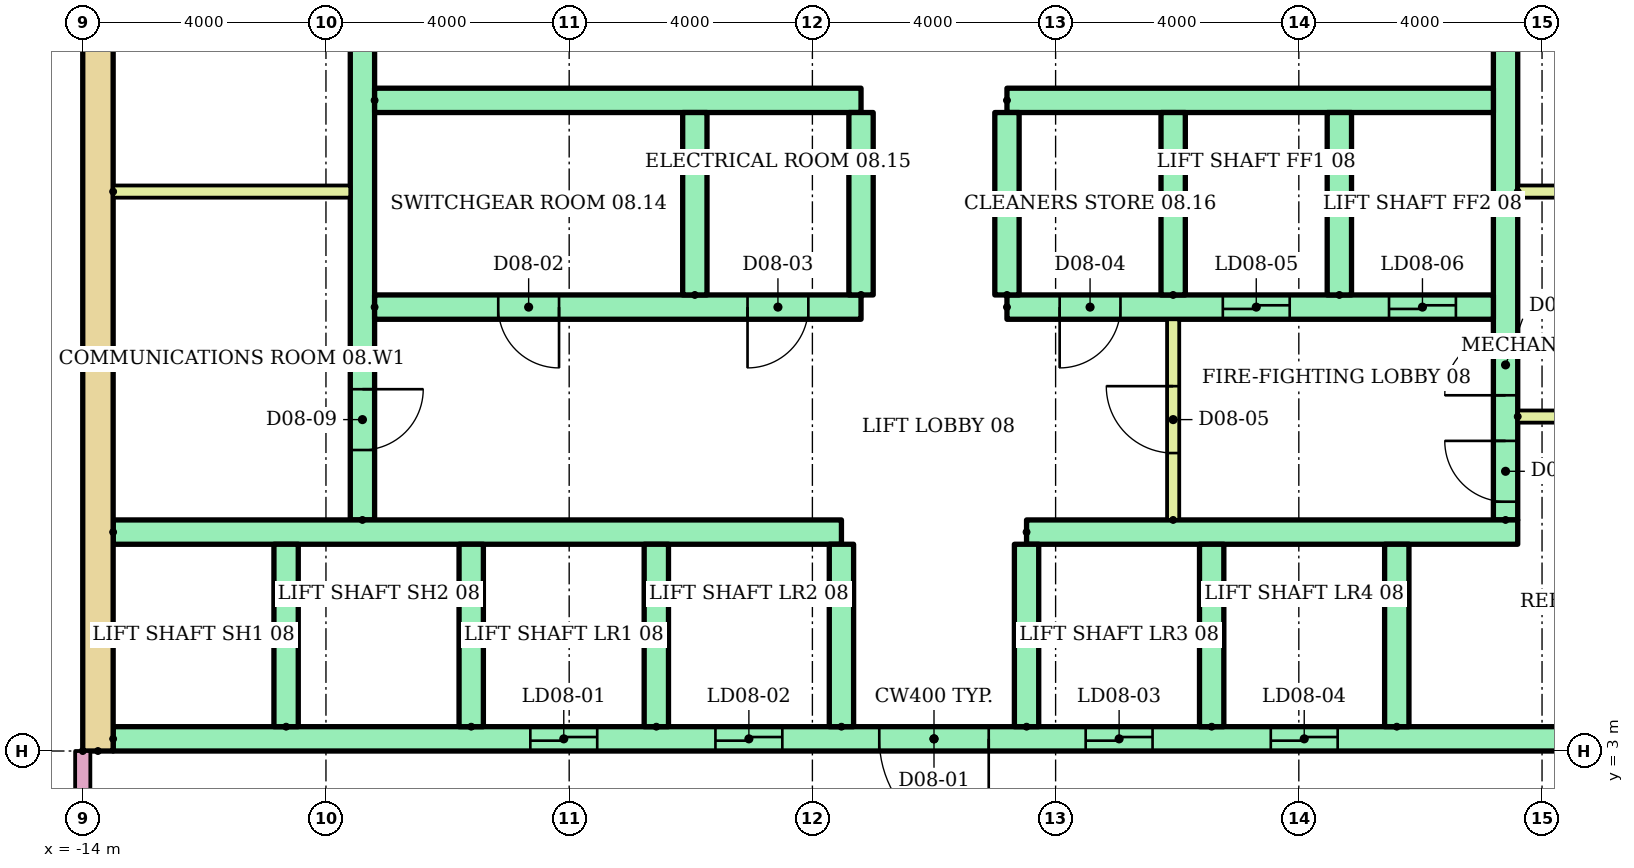
"""IFC4 building model, lengths in metres.
Left out: names, types, materials, properties, quantities, classifications, styles, units other than length and angle.
Written with IfcOpenShell. Run it as: python <this file> out.ifc"""

import sys

from ifc_helpers import new_model, si_unit, direction, frame, frame_2d, origin, place, context, subcontext, project, spatial, rectangle, extrude, element, fill, save


model = new_model("IFC4")
c1 = context("Model", 3, precision=1e-05, world=origin(), true_north=direction((0.0, 1.0)))
c2 = subcontext(c1, "Body", "Model", "MODEL_VIEW")
j1 = project(units=[si_unit("LENGTHUNIT", "METRE"), si_unit("PLANEANGLEUNIT", "RADIAN")], contexts=[c1])
p1 = place(None, origin())
s1 = spatial("IfcSite", under=j1, at=p1, CompositionType="ELEMENT")
p2 = place(p1, origin())
s2 = spatial("IfcBuilding", under=s1, at=p2, CompositionType="ELEMENT")
p3 = place(p2, frame((0.0, 0.0, 33.8)))
s3 = spatial("IfcBuildingStorey", under=s2, at=p3, CompositionType="ELEMENT", Elevation=33.8)
p4 = place(p3, frame((-13.75, 3.0, 0.0), z_axis=(0.0, 0.0, 1.0), x_axis=(0.0, 1.0, 0.0)))
e1 = element("IfcWall", 1, at=p4, inside=s3, PredefinedType="SHEAR", context=c2, shape_type="SweptSolid", body=[
    extrude(rectangle(XDim=17.0, YDim=0.5, at=frame_2d((8.5, 0.0))), origin(), (0.0, 0.0, 1.0), 3.6),
])
p5 = place(p3, frame((-9.4, 6.8, 0.0), z_axis=(0.0, 0.0, 1.0), x_axis=(0.0, 1.0, 0.0)))
e2 = element("IfcWall", 2, at=p5, inside=s3, PredefinedType="SHEAR", context=c2, shape_type="SweptSolid", body=[
    extrude(rectangle(XDim=12.7, YDim=0.4, at=frame_2d((6.35, 0.0))), origin(), (0.0, 0.0, 1.0), 3.6),
])
p6 = place(p5, frame((1.15, 0.0, 0.0)))
e3 = element("IfcOpeningElement", 3, at=p6, cuts=e2, PredefinedType="OPENING", context=c2, shape_type="SweptSolid", body=[
    extrude(rectangle(XDim=1.0, YDim=2.1, at=frame_2d((0.5, 1.05))), frame((0.0, 0.21, 0.0), z_axis=(0.0, -1.0, 0.0), x_axis=(1.0, 0.0, 0.0)), (0.0, 0.0, 1.0), 0.42),
])
p7 = place(p5, frame((7.925, 0.0, 0.0)))
e4 = element("IfcOpeningElement", 4, at=p7, cuts=e2, PredefinedType="OPENING", context=c2, shape_type="SweptSolid", body=[
    extrude(rectangle(XDim=1.0, YDim=2.1, at=frame_2d((0.5, 1.05))), frame((0.0, 0.21, 0.0), z_axis=(0.0, -1.0, 0.0), x_axis=(1.0, 0.0, 0.0)), (0.0, 0.0, 1.0), 0.42),
])
p8 = place(p3, frame((9.4, 6.8, 0.0), z_axis=(0.0, 0.0, 1.0), x_axis=(0.0, 1.0, 0.0)))
e5 = element("IfcWall", 5, at=p8, inside=s3, PredefinedType="SHEAR", context=c2, shape_type="SweptSolid", body=[
    extrude(rectangle(XDim=12.7, YDim=0.4, at=frame_2d((6.35, 0.0))), origin(), (0.0, 0.0, 1.0), 3.6),
])
p9 = place(p8, frame((0.3, 0.0, 0.0)))
e6 = element("IfcOpeningElement", 6, at=p9, cuts=e5, PredefinedType="OPENING", context=c2, shape_type="SweptSolid", body=[
    extrude(rectangle(XDim=1.0, YDim=2.1, at=frame_2d((0.5, 1.05))), frame((0.0, 0.21, 0.0), z_axis=(0.0, -1.0, 0.0), x_axis=(1.0, 0.0, 0.0)), (0.0, 0.0, 1.0), 0.42),
])
p10 = place(p8, frame((2.05, 0.0, 0.0)))
e7 = element("IfcOpeningElement", 7, at=p10, cuts=e5, PredefinedType="OPENING", context=c2, shape_type="SweptSolid", body=[
    extrude(rectangle(XDim=1.0, YDim=2.1, at=frame_2d((0.5, 1.05))), frame((0.0, 0.21, 0.0), z_axis=(0.0, -1.0, 0.0), x_axis=(1.0, 0.0, 0.0)), (0.0, 0.0, 1.0), 0.42),
])
p11 = place(p8, frame((7.925, 0.0, 0.0)))
e8 = element("IfcOpeningElement", 8, at=p11, cuts=e5, PredefinedType="OPENING", context=c2, shape_type="SweptSolid", body=[
    extrude(rectangle(XDim=1.0, YDim=2.1, at=frame_2d((0.5, 1.05))), frame((0.0, 0.21, 0.0), z_axis=(0.0, -1.0, 0.0), x_axis=(1.0, 0.0, 0.0)), (0.0, 0.0, 1.0), 0.42),
])
p12 = place(p3, frame((-13.5, 3.2, 0.0)))
e9 = element("IfcWall", 9, at=p12, inside=s3, PredefinedType="SHEAR", context=c2, shape_type="SweptSolid", body=[
    extrude(rectangle(XDim=27.0, YDim=0.4, at=frame_2d((13.5, 0.0))), origin(), (0.0, 0.0, 1.0), 3.6),
])
p13 = place(p12, frame((6.861, 0.0, 0.0)))
e10 = element("IfcOpeningElement", 10, at=p13, cuts=e9, PredefinedType="OPENING", context=c2, shape_type="SweptSolid", body=[
    extrude(rectangle(XDim=1.1, YDim=2.1, at=frame_2d((0.55, 1.05))), frame((0.0, 0.21, 0.0), z_axis=(0.0, -1.0, 0.0), x_axis=(1.0, 0.0, 0.0)), (0.0, 0.0, 1.0), 0.42),
])
p14 = place(p12, frame((9.906, 0.0, 0.0)))
e11 = element("IfcOpeningElement", 11, at=p14, cuts=e9, PredefinedType="OPENING", context=c2, shape_type="SweptSolid", body=[
    extrude(rectangle(XDim=1.1, YDim=2.1, at=frame_2d((0.55, 1.05))), frame((0.0, 0.21, 0.0), z_axis=(0.0, -1.0, 0.0), x_axis=(1.0, 0.0, 0.0)), (0.0, 0.0, 1.0), 0.42),
])
p15 = place(p12, frame((15.994, 0.0, 0.0)))
e12 = element("IfcOpeningElement", 12, at=p15, cuts=e9, PredefinedType="OPENING", context=c2, shape_type="SweptSolid", body=[
    extrude(rectangle(XDim=1.1, YDim=2.1, at=frame_2d((0.55, 1.05))), frame((0.0, 0.21, 0.0), z_axis=(0.0, -1.0, 0.0), x_axis=(1.0, 0.0, 0.0)), (0.0, 0.0, 1.0), 0.42),
])
p16 = place(p12, frame((19.039, 0.0, 0.0)))
e13 = element("IfcOpeningElement", 13, at=p16, cuts=e9, PredefinedType="OPENING", context=c2, shape_type="SweptSolid", body=[
    extrude(rectangle(XDim=1.1, YDim=2.1, at=frame_2d((0.55, 1.05))), frame((0.0, 0.21, 0.0), z_axis=(0.0, -1.0, 0.0), x_axis=(1.0, 0.0, 0.0)), (0.0, 0.0, 1.0), 0.42),
])
p17 = place(p12, frame((12.6, 0.0, 0.0)))
e14 = element("IfcOpeningElement", 14, at=p17, cuts=e9, PredefinedType="OPENING", context=c2, shape_type="SweptSolid", body=[
    extrude(rectangle(XDim=1.8, YDim=2.1, at=frame_2d((0.9, 1.05))), frame((0.0, 0.21, 0.0), z_axis=(0.0, -1.0, 0.0), x_axis=(1.0, 0.0, 0.0)), (0.0, 0.0, 1.0), 0.42),
])
p18 = place(p3, frame((-13.5, 6.6, 0.0)))
e15 = element("IfcWall", 15, at=p18, inside=s3, PredefinedType="SHEAR", context=c2, shape_type="SweptSolid", body=[
    extrude(rectangle(XDim=11.978, YDim=0.4, at=frame_2d((5.989, 0.0))), origin(), (0.0, 0.0, 1.0), 3.6),
])
p19 = place(p3, frame((1.522, 6.6, 0.0)))
e16 = element("IfcWall", 16, at=p19, inside=s3, PredefinedType="SHEAR", context=c2, shape_type="SweptSolid", body=[
    extrude(rectangle(XDim=8.078, YDim=0.4, at=frame_2d((4.039, 0.0))), origin(), (0.0, 0.0, 1.0), 3.6),
])
for number, where, z_axis, x_axis in (
    (17, (-10.656, 3.4, 0.0), (0.0, 0.0, 1.0), (0.0, 1.0, 0.0)),
    (18, (-7.611, 3.4, 0.0), (0.0, 0.0, 1.0), (0.0, 1.0, 0.0)),
    (19, (-4.567, 3.4, 0.0), (0.0, 0.0, 1.0), (0.0, 1.0, 0.0)),
    (20, (-1.522, 3.4, 0.0), (0.0, 0.0, 1.0), (0.0, 1.0, 0.0)),
    (21, (1.522, 3.4, 0.0), (0.0, 0.0, 1.0), (0.0, 1.0, 0.0)),
    (22, (4.567, 3.4, 0.0), (0.0, 0.0, 1.0), (0.0, 1.0, 0.0)),
    (23, (7.611, 3.4, 0.0), (0.0, 0.0, 1.0), (0.0, 1.0, 0.0)),
):
    element("IfcWall", number, at=place(p3, frame(where, z_axis=z_axis, x_axis=x_axis)), inside=s3, PredefinedType="SHEAR", context=c2, shape_type="SweptSolid", body=[
        extrude(rectangle(XDim=3.0, YDim=0.4, at=frame_2d((1.5, 0.0))), origin(), (0.0, 0.0, 1.0), 3.6),
    ])
p20 = place(p3, frame((-9.2, 10.3, 0.0)))
e24 = element("IfcWall", 24, at=p20, inside=s3, PredefinedType="SHEAR", context=c2, shape_type="SweptSolid", body=[
    extrude(rectangle(XDim=8.0, YDim=0.4, at=frame_2d((4.0, 0.0))), origin(), (0.0, 0.0, 1.0), 3.6),
])
p21 = place(p20, frame((2.033, 0.0, 0.0)))
e25 = element("IfcOpeningElement", 25, at=p21, cuts=e24, PredefinedType="OPENING", context=c2, shape_type="SweptSolid", body=[
    extrude(rectangle(XDim=1.0, YDim=2.1, at=frame_2d((0.5, 1.05))), frame((0.0, 0.21, 0.0), z_axis=(0.0, -1.0, 0.0), x_axis=(1.0, 0.0, 0.0)), (0.0, 0.0, 1.0), 0.42),
])
p22 = place(p20, frame((6.133, 0.0, 0.0)))
e26 = element("IfcOpeningElement", 26, at=p22, cuts=e24, PredefinedType="OPENING", context=c2, shape_type="SweptSolid", body=[
    extrude(rectangle(XDim=1.0, YDim=2.1, at=frame_2d((0.5, 1.05))), frame((0.0, 0.21, 0.0), z_axis=(0.0, -1.0, 0.0), x_axis=(1.0, 0.0, 0.0)), (0.0, 0.0, 1.0), 0.42),
])
p23 = place(p3, frame((-9.2, 13.7, 0.0)))
e27 = element("IfcWall", 27, at=p23, inside=s3, PredefinedType="SHEAR", context=c2, shape_type="SweptSolid", body=[
    extrude(rectangle(XDim=8.0, YDim=0.4, at=frame_2d((4.0, 0.0))), origin(), (0.0, 0.0, 1.0), 3.6),
])
p24 = place(p3, frame((1.2, 10.3, 0.0)))
e28 = element("IfcWall", 28, at=p24, inside=s3, PredefinedType="SHEAR", context=c2, shape_type="SweptSolid", body=[
    extrude(rectangle(XDim=8.0, YDim=0.4, at=frame_2d((4.0, 0.0))), origin(), (0.0, 0.0, 1.0), 3.6),
])
p25 = place(p24, frame((3.55, 0.0, 0.0)))
e29 = element("IfcOpeningElement", 29, at=p25, cuts=e28, PredefinedType="OPENING", context=c2, shape_type="SweptSolid", body=[
    extrude(rectangle(XDim=1.1, YDim=2.1, at=frame_2d((0.55, 1.05))), frame((0.0, 0.21, 0.0), z_axis=(0.0, -1.0, 0.0), x_axis=(1.0, 0.0, 0.0)), (0.0, 0.0, 1.0), 0.42),
])
p26 = place(p24, frame((6.283, 0.0, 0.0)))
e30 = element("IfcOpeningElement", 30, at=p26, cuts=e28, PredefinedType="OPENING", context=c2, shape_type="SweptSolid", body=[
    extrude(rectangle(XDim=1.1, YDim=2.1, at=frame_2d((0.55, 1.05))), frame((0.0, 0.21, 0.0), z_axis=(0.0, -1.0, 0.0), x_axis=(1.0, 0.0, 0.0)), (0.0, 0.0, 1.0), 0.42),
])
p27 = place(p24, frame((0.867, 0.0, 0.0)))
e31 = element("IfcOpeningElement", 31, at=p27, cuts=e28, PredefinedType="OPENING", context=c2, shape_type="SweptSolid", body=[
    extrude(rectangle(XDim=1.0, YDim=2.1, at=frame_2d((0.5, 1.05))), frame((0.0, 0.21, 0.0), z_axis=(0.0, -1.0, 0.0), x_axis=(1.0, 0.0, 0.0)), (0.0, 0.0, 1.0), 0.42),
])
p28 = place(p3, frame((1.2, 13.7, 0.0)))
e32 = element("IfcWall", 32, at=p28, inside=s3, PredefinedType="SHEAR", context=c2, shape_type="SweptSolid", body=[
    extrude(rectangle(XDim=8.0, YDim=0.4, at=frame_2d((4.0, 0.0))), origin(), (0.0, 0.0, 1.0), 3.6),
])
for number, where, z_axis, x_axis in (
    (33, (-3.933, 10.5, 0.0), (0.0, 0.0, 1.0), (0.0, 1.0, 0.0)),
    (34, (-1.2, 10.5, 0.0), (0.0, 0.0, 1.0), (0.0, 1.0, 0.0)),
    (35, (1.2, 10.5, 0.0), (0.0, 0.0, 1.0), (0.0, 1.0, 0.0)),
    (36, (3.933, 10.5, 0.0), (0.0, 0.0, 1.0), (0.0, 1.0, 0.0)),
    (37, (6.667, 10.5, 0.0), (0.0, 0.0, 1.0), (0.0, 1.0, 0.0)),
):
    element("IfcWall", number, at=place(p3, frame(where, z_axis=z_axis, x_axis=x_axis)), inside=s3, PredefinedType="SHEAR", context=c2, shape_type="SweptSolid", body=[
        extrude(rectangle(XDim=3.0, YDim=0.4, at=frame_2d((1.5, 0.0))), origin(), (0.0, 0.0, 1.0), 3.6),
    ])
p29 = place(p3, frame((3.933, 6.8, 0.0), z_axis=(0.0, 0.0, 1.0), x_axis=(0.0, 1.0, 0.0)))
e38 = element("IfcWall", 38, at=p29, inside=s3, PredefinedType="PARTITIONING", context=c2, shape_type="SweptSolid", body=[
    extrude(rectangle(XDim=3.3, YDim=0.2, at=frame_2d((1.65, 0.0))), origin(), (0.0, 0.0, 1.0), 3.6),
])
p30 = place(p29, frame((1.1, 0.0, 0.0)))
e39 = element("IfcOpeningElement", 39, at=p30, cuts=e38, PredefinedType="OPENING", context=c2, shape_type="SweptSolid", body=[
    extrude(rectangle(XDim=1.1, YDim=2.1, at=frame_2d((0.55, 1.05))), frame((0.0, 0.11, 0.0), z_axis=(0.0, -1.0, 0.0), x_axis=(1.0, 0.0, 0.0)), (0.0, 0.0, 1.0), 0.22),
])
for number, where in (
    (40, (-13.5, 12.2, 0.0)),
    (41, (9.6, 8.5, 0.0)),
    (42, (9.6, 12.2, 0.0)),
):
    element("IfcWall", number, at=place(p3, frame(where)), inside=s3, PredefinedType="PARTITIONING", context=c2, shape_type="SweptSolid", body=[
        extrude(rectangle(XDim=3.9, YDim=0.2, at=frame_2d((1.95, 0.0))), origin(), (0.0, 0.0, 1.0), 3.6),
    ])
p31 = place(p3, frame((-14.0, 3.0, 0.0), z_axis=(0.0, 0.0, 1.0), x_axis=(0.0, -1.0, 0.0)))
e43 = element("IfcWall", 43, at=p31, inside=s3, PredefinedType="PARTITIONING", context=c2, shape_type="SweptSolid", body=[
    extrude(rectangle(XDim=1.6, YDim=0.25, at=frame_2d((0.8, 0.0))), origin(), (0.0, 0.0, 1.0), 3.1),
])
p32 = place(p13, origin())
e44 = element("IfcDoor", 44, at=p32, inside=s3, OperationType="SLIDING_TO_LEFT", PredefinedType="DOOR", context=c2, shape_type="SweptSolid", body=[
    extrude(rectangle(XDim=1.1, YDim=2.1, at=frame_2d((0.55, 1.05))), frame((0.0, 0.025, 0.0), z_axis=(0.0, -1.0, 0.0), x_axis=(1.0, 0.0, 0.0)), (0.0, 0.0, 1.0), 0.05),
])
fill(e10, e44)
p33 = place(p14, origin())
e45 = element("IfcDoor", 45, at=p33, inside=s3, OperationType="SLIDING_TO_LEFT", PredefinedType="DOOR", context=c2, shape_type="SweptSolid", body=[
    extrude(rectangle(XDim=1.1, YDim=2.1, at=frame_2d((0.55, 1.05))), frame((0.0, 0.025, 0.0), z_axis=(0.0, -1.0, 0.0), x_axis=(1.0, 0.0, 0.0)), (0.0, 0.0, 1.0), 0.05),
])
fill(e11, e45)
p34 = place(p15, origin())
e46 = element("IfcDoor", 46, at=p34, inside=s3, OperationType="SLIDING_TO_LEFT", PredefinedType="DOOR", context=c2, shape_type="SweptSolid", body=[
    extrude(rectangle(XDim=1.1, YDim=2.1, at=frame_2d((0.55, 1.05))), frame((0.0, 0.025, 0.0), z_axis=(0.0, -1.0, 0.0), x_axis=(1.0, 0.0, 0.0)), (0.0, 0.0, 1.0), 0.05),
])
fill(e12, e46)
p35 = place(p16, origin())
e47 = element("IfcDoor", 47, at=p35, inside=s3, OperationType="SLIDING_TO_LEFT", PredefinedType="DOOR", context=c2, shape_type="SweptSolid", body=[
    extrude(rectangle(XDim=1.1, YDim=2.1, at=frame_2d((0.55, 1.05))), frame((0.0, 0.025, 0.0), z_axis=(0.0, -1.0, 0.0), x_axis=(1.0, 0.0, 0.0)), (0.0, 0.0, 1.0), 0.05),
])
fill(e13, e47)
p36 = place(p17, frame((1.8, 0.0, 0.0), z_axis=(0.0, 0.0, 1.0), x_axis=(-1.0, 0.0, 0.0)))
e48 = element("IfcDoor", 48, at=p36, inside=s3, OperationType="DOUBLE_DOOR_SINGLE_SWING", PredefinedType="DOOR", context=c2, shape_type="SweptSolid", body=[
    extrude(rectangle(XDim=1.8, YDim=2.1, at=frame_2d((0.9, 1.05))), frame((0.0, 0.025, 0.0), z_axis=(0.0, -1.0, 0.0), x_axis=(1.0, 0.0, 0.0)), (0.0, 0.0, 1.0), 0.05),
])
fill(e14, e48)
p37 = place(p25, origin())
e49 = element("IfcDoor", 49, at=p37, inside=s3, OperationType="SLIDING_TO_LEFT", PredefinedType="DOOR", context=c2, shape_type="SweptSolid", body=[
    extrude(rectangle(XDim=1.1, YDim=2.1, at=frame_2d((0.55, 1.05))), frame((0.0, 0.025, 0.0), z_axis=(0.0, -1.0, 0.0), x_axis=(1.0, 0.0, 0.0)), (0.0, 0.0, 1.0), 0.05),
])
fill(e29, e49)
p38 = place(p26, origin())
e50 = element("IfcDoor", 50, at=p38, inside=s3, OperationType="SLIDING_TO_LEFT", PredefinedType="DOOR", context=c2, shape_type="SweptSolid", body=[
    extrude(rectangle(XDim=1.1, YDim=2.1, at=frame_2d((0.55, 1.05))), frame((0.0, 0.025, 0.0), z_axis=(0.0, -1.0, 0.0), x_axis=(1.0, 0.0, 0.0)), (0.0, 0.0, 1.0), 0.05),
])
fill(e30, e50)
p39 = place(p21, frame((1.0, 0.0, 0.0), z_axis=(0.0, 0.0, 1.0), x_axis=(-1.0, 0.0, 0.0)))
e51 = element("IfcDoor", 51, at=p39, inside=s3, OperationType="SINGLE_SWING_RIGHT", PredefinedType="DOOR", context=c2, shape_type="SweptSolid", body=[
    extrude(rectangle(XDim=1.0, YDim=2.1, at=frame_2d((0.5, 1.05))), frame((0.0, 0.025, 0.0), z_axis=(0.0, -1.0, 0.0), x_axis=(1.0, 0.0, 0.0)), (0.0, 0.0, 1.0), 0.05),
])
fill(e25, e51)
p40 = place(p22, frame((1.0, 0.0, 0.0), z_axis=(0.0, 0.0, 1.0), x_axis=(-1.0, 0.0, 0.0)))
e52 = element("IfcDoor", 52, at=p40, inside=s3, OperationType="SINGLE_SWING_LEFT", PredefinedType="DOOR", context=c2, shape_type="SweptSolid", body=[
    extrude(rectangle(XDim=1.0, YDim=2.1, at=frame_2d((0.5, 1.05))), frame((0.0, 0.025, 0.0), z_axis=(0.0, -1.0, 0.0), x_axis=(1.0, 0.0, 0.0)), (0.0, 0.0, 1.0), 0.05),
])
fill(e26, e52)
p41 = place(p27, frame((1.0, 0.0, 0.0), z_axis=(0.0, 0.0, 1.0), x_axis=(-1.0, 0.0, 0.0)))
e53 = element("IfcDoor", 53, at=p41, inside=s3, OperationType="SINGLE_SWING_LEFT", PredefinedType="DOOR", context=c2, shape_type="SweptSolid", body=[
    extrude(rectangle(XDim=1.0, YDim=2.1, at=frame_2d((0.5, 1.05))), frame((0.0, 0.025, 0.0), z_axis=(0.0, -1.0, 0.0), x_axis=(1.0, 0.0, 0.0)), (0.0, 0.0, 1.0), 0.05),
])
fill(e31, e53)
p42 = place(p30, origin())
e54 = element("IfcDoor", 54, at=p42, inside=s3, OperationType="SINGLE_SWING_RIGHT", PredefinedType="DOOR", context=c2, shape_type="SweptSolid", body=[
    extrude(rectangle(XDim=1.1, YDim=2.1, at=frame_2d((0.55, 1.05))), frame((0.0, 0.025, 0.0), z_axis=(0.0, -1.0, 0.0), x_axis=(1.0, 0.0, 0.0)), (0.0, 0.0, 1.0), 0.05),
])
fill(e39, e54)
p43 = place(p6, frame((1.0, 0.0, 0.0), z_axis=(0.0, 0.0, 1.0), x_axis=(-1.0, 0.0, 0.0)))
e55 = element("IfcDoor", 55, at=p43, inside=s3, OperationType="SINGLE_SWING_RIGHT", PredefinedType="DOOR", context=c2, shape_type="SweptSolid", body=[
    extrude(rectangle(XDim=1.0, YDim=2.1, at=frame_2d((0.5, 1.05))), frame((0.0, 0.025, 0.0), z_axis=(0.0, -1.0, 0.0), x_axis=(1.0, 0.0, 0.0)), (0.0, 0.0, 1.0), 0.05),
])
fill(e3, e55)
p44 = place(p9, origin())
e56 = element("IfcDoor", 56, at=p44, inside=s3, OperationType="SINGLE_SWING_RIGHT", PredefinedType="DOOR", context=c2, shape_type="SweptSolid", body=[
    extrude(rectangle(XDim=1.0, YDim=2.1, at=frame_2d((0.5, 1.05))), frame((0.0, 0.025, 0.0), z_axis=(0.0, -1.0, 0.0), x_axis=(1.0, 0.0, 0.0)), (0.0, 0.0, 1.0), 0.05),
])
fill(e6, e56)
p45 = place(p10, origin())
e57 = element("IfcDoor", 57, at=p45, inside=s3, OperationType="SINGLE_SWING_LEFT", PredefinedType="DOOR", context=c2, shape_type="SweptSolid", body=[
    extrude(rectangle(XDim=1.0, YDim=2.1, at=frame_2d((0.5, 1.05))), frame((0.0, 0.025, 0.0), z_axis=(0.0, -1.0, 0.0), x_axis=(1.0, 0.0, 0.0)), (0.0, 0.0, 1.0), 0.05),
])
fill(e7, e57)
save(model, sys.argv[1])
